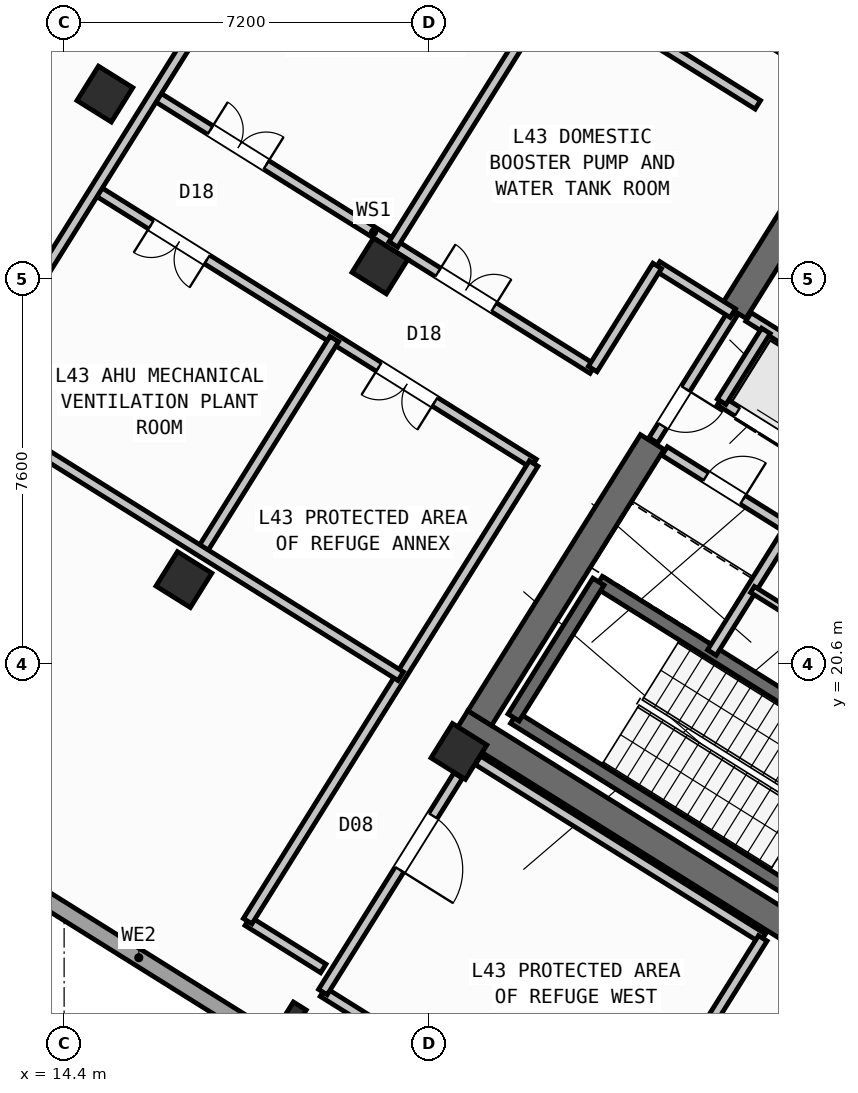
"""IFC4 building model, lengths in metres.
Left out: names, types, materials, properties, quantities, classifications, styles, units other than length and angle.
Written with IfcOpenShell. Run it as: python <this file> out.ifc"""

import sys

from ifc_helpers import new_model, si_unit, direction, frame, frame_2d, origin, origin_2d, place, context, subcontext, project, spatial, rectangle, hollow_rectangle, i_section, extrude, source, transform, mapped, element, fill, save


model = new_model("IFC4")
c1 = context("Model", 3, precision=1e-05, world=origin(), true_north=direction((0.0, 1.0)))
c2 = subcontext(c1, "Body", "Model", "MODEL_VIEW")
j1 = project(units=[si_unit("LENGTHUNIT", "METRE"), si_unit("PLANEANGLEUNIT", "RADIAN")], contexts=[c1])
p1 = place(None, origin())
s1 = spatial("IfcSite", under=j1, at=p1, CompositionType="ELEMENT")
p2 = place(p1, origin())
s2 = spatial("IfcBuilding", under=s1, at=p2, CompositionType="ELEMENT")
p3 = place(p2, frame((0.0, 0.0, 169.5)))
s3 = spatial("IfcBuildingStorey", under=s2, at=p3, CompositionType="ELEMENT", Elevation=169.5)
p4 = place(p3, frame((33.366, 12.477, 0.0), z_axis=(0.0, 0.0, 1.0), x_axis=(-0.848047359947, 0.529920442413, 0.0)))
e1 = element("IfcWall", 1, at=p4, inside=s3, PredefinedType="SHEAR", context=c2, shape_type="SweptSolid", body=[
    extrude(rectangle(XDim=13.14, YDim=0.55, at=frame_2d((6.57, 0.0))), origin(), (0.0, 0.0, 1.0), 5.15),
])
p5 = place(p3, frame((29.517, 30.594, 0.0), z_axis=(0.0, 0.0, 1.0), x_axis=(-0.529906864564, -0.848055844204, 0.0)))
e2 = element("IfcWall", 2, at=p5, inside=s3, PredefinedType="SHEAR", context=c2, shape_type="SweptSolid", body=[
    extrude(rectangle(XDim=3.575, YDim=0.55, at=frame_2d((1.788, 0.0))), origin(), (0.0, 0.0, 1.0), 5.15),
])
p6 = place(p3, frame((26.007, 24.976, 0.0), z_axis=(0.0, 0.0, 1.0), x_axis=(-0.529923795287, -0.848045264823, 0.0)))
e3 = element("IfcWall", 3, at=p6, inside=s3, PredefinedType="SHEAR", context=c2, shape_type="SweptSolid", body=[
    extrude(rectangle(XDim=6.425, YDim=0.55, at=frame_2d((3.212, 0.0))), origin(), (0.0, 0.0, 1.0), 5.15),
])
m1 = source(origin(), c2, "Body", "SweptSolid", [
    extrude(hollow_rectangle(XDim=0.8, YDim=0.8, WallThickness=0.032, at=origin_2d()), origin(), (0.0, 0.0, 1.0), 5.4),
])
p7 = place(p3, frame((22.191, 18.87, 0.0), z_axis=(0.0, 0.0, 1.0), x_axis=(-0.848048096156, 0.529919264233, 0.0)))
e4 = element("IfcColumn", 4, at=p7, inside=s3, PredefinedType="COLUMN", context=c2, shape_type="MappedRepresentation", body=[
    mapped(m1, transform((0.0, 0.0, 0.0), scale=1.0)),
])
m2 = source(origin(), c2, "Body", "SweptSolid", [
    extrude(i_section(OverallWidth=0.3, OverallDepth=0.55, WebThickness=0.015, FlangeThickness=0.029, at=origin_2d()), origin(), (0.0, 0.0, 1.0), 5.4),
])
p8 = place(p3, frame((18.906, 13.612, 0.0), z_axis=(0.0, 0.0, 1.0), x_axis=(-0.848048096156, 0.529919264233, 0.0)))
e5 = element("IfcColumn", 5, at=p8, inside=s3, PredefinedType="COLUMN", context=c2, shape_type="MappedRepresentation", body=[
    mapped(m2, transform((0.0, 0.0, 0.0), scale=1.0)),
])
for number, where, z_axis, x_axis in (
    (6, (20.632, 28.452, 0.0), (0.0, 0.0, 1.0), (-0.848, 0.53, 0.0)),
    (7, (16.764, 22.261, 0.0), (0.0, 0.0, 1.0), (-0.848, 0.53, 0.0)),
    (8, (15.205, 31.844, 0.0), (0.0, 0.0, 1.0), (-0.848, 0.53, 0.0)),
):
    element("IfcColumn", number, at=place(p3, frame(where, z_axis=z_axis, x_axis=x_axis)), inside=s3, PredefinedType="COLUMN", context=c2, shape_type="MappedRepresentation", body=[
        mapped(m1, transform((0.0, 0.0, 0.0), scale=1.0)),
    ])
p9 = place(p3, frame((29.268, 6.429, 0.0), z_axis=(0.0, 0.0, 1.0), x_axis=(-0.848049971435, 0.529916263149, 0.0)))
e9 = element("IfcWall", 9, at=p9, inside=s3, PredefinedType="STANDARD", context=c2, shape_type="SweptSolid", body=[
    extrude(rectangle(XDim=31.588, YDim=0.32, at=frame_2d((15.794, 0.0))), origin(), (0.0, 0.0, 1.0), 5.15),
])
p10 = place(p9, frame((6.007, 0.0, 0.95)))
e10 = element("IfcOpeningElement", 10, at=p10, cuts=e9, PredefinedType="OPENING", context=c2, shape_type="SweptSolid", body=[
    extrude(rectangle(XDim=1.25, YDim=1.4, at=frame_2d((0.625, 0.7))), frame((0.0, 0.17, 0.0), z_axis=(0.0, -1.0, 0.0), x_axis=(1.0, 0.0, 0.0)), (0.0, 0.0, 1.0), 0.34),
])
p11 = place(p3, frame((14.138, 41.825, 0.0), z_axis=(0.0, 0.0, 1.0), x_axis=(0.848046498049, -0.529921821731, 0.0)))
e11 = element("IfcWall", 11, at=p11, inside=s3, PredefinedType="STANDARD", context=c2, shape_type="SweptSolid", body=[
    extrude(rectangle(XDim=31.588, YDim=0.32, at=frame_2d((15.794, 0.0))), origin(), (0.0, 0.0, 1.0), 5.15),
])
p12 = place(p11, frame((2.369, 0.0, 0.95)))
e12 = element("IfcOpeningElement", 12, at=p12, cuts=e11, PredefinedType="OPENING", context=c2, shape_type="SweptSolid", body=[
    extrude(rectangle(XDim=1.25, YDim=1.4, at=frame_2d((0.625, 0.7))), frame((0.0, 0.17, 0.0), z_axis=(0.0, -1.0, 0.0), x_axis=(1.0, 0.0, 0.0)), (0.0, 0.0, 1.0), 0.34),
])
p13 = place(p11, frame((8.769, 0.0, 0.95)))
e13 = element("IfcOpeningElement", 13, at=p13, cuts=e11, PredefinedType="OPENING", context=c2, shape_type="SweptSolid", body=[
    extrude(rectangle(XDim=1.25, YDim=1.4, at=frame_2d((0.625, 0.7))), frame((0.0, 0.17, 0.0), z_axis=(0.0, -1.0, 0.0), x_axis=(1.0, 0.0, 0.0)), (0.0, 0.0, 1.0), 0.34),
])
p14 = place(p11, frame((15.169, 0.0, 0.95)))
e14 = element("IfcOpeningElement", 14, at=p14, cuts=e11, PredefinedType="OPENING", context=c2, shape_type="SweptSolid", body=[
    extrude(rectangle(XDim=1.25, YDim=1.4, at=frame_2d((0.625, 0.7))), frame((0.0, 0.17, 0.0), z_axis=(0.0, -1.0, 0.0), x_axis=(1.0, 0.0, 0.0)), (0.0, 0.0, 1.0), 0.34),
])
p15 = place(p11, frame((24.688, 0.0, 0.95)))
e15 = element("IfcOpeningElement", 15, at=p15, cuts=e11, PredefinedType="OPENING", context=c2, shape_type="SweptSolid", body=[
    extrude(rectangle(XDim=1.25, YDim=1.4, at=frame_2d((0.625, 0.7))), frame((0.0, 0.17, 0.0), z_axis=(0.0, -1.0, 0.0), x_axis=(1.0, 0.0, 0.0)), (0.0, 0.0, 1.0), 0.34),
])
p16 = place(p3, frame((29.605, 15.581, 0.0), z_axis=(0.0, 0.0, 1.0), x_axis=(-0.848036911448, 0.529937163087, 0.0)))
e16 = element("IfcWall", 16, at=p16, inside=s3, PredefinedType="SHEAR", context=c2, shape_type="SweptSolid", body=[
    extrude(rectangle(XDim=7.46, YDim=0.26, at=frame_2d((3.73, 0.0))), origin(), (0.0, 0.0, 1.0), 5.15),
])
p17 = place(p3, frame((31.28, 18.261, 0.0), z_axis=(0.0, 0.0, 1.0), x_axis=(-0.848051618787, 0.529913626805, 0.0)))
e17 = element("IfcWall", 17, at=p17, inside=s3, PredefinedType="SHEAR", context=c2, shape_type="SweptSolid", body=[
    extrude(rectangle(XDim=7.46, YDim=0.26, at=frame_2d((3.73, 0.0))), origin(), (0.0, 0.0, 1.0), 5.15),
])
p18 = place(p17, frame((0.36, 0.0, 0.0)))
e18 = element("IfcOpeningElement", 18, at=p18, cuts=e17, PredefinedType="OPENING", context=c2, shape_type="SweptSolid", body=[
    extrude(rectangle(XDim=0.86, YDim=2.05, at=frame_2d((0.43, 1.025))), frame((0.0, 0.14, 0.0), z_axis=(0.0, -1.0, 0.0), x_axis=(1.0, 0.0, 0.0)), (0.0, 0.0, 1.0), 0.28),
])
p19 = place(p3, frame((24.945, 22.22, 0.0), z_axis=(0.0, 0.0, 1.0), x_axis=(-0.529908658664, -0.84805472316, 0.0)))
e19 = element("IfcWall", 19, at=p19, inside=s3, PredefinedType="SHEAR", context=c2, shape_type="SweptSolid", body=[
    extrude(rectangle(XDim=3.16, YDim=0.26, at=frame_2d((1.58, 0.0))), origin(), (0.0, 0.0, 1.0), 5.15),
])
p20 = place(p3, frame((31.822, 24.998, 0.0), z_axis=(0.0, 0.0, 1.0), x_axis=(-0.848036912365, 0.52993716162, 0.0)))
e20 = element("IfcWall", 20, at=p20, inside=s3, PredefinedType="STANDARD", context=c2, shape_type="SweptSolid", body=[
    extrude(rectangle(XDim=4.618, YDim=0.2, at=frame_2d((2.309, 0.0))), origin(), (0.0, 0.0, 1.0), 5.14),
])
p21 = place(p3, frame((32.108, 22.814, 0.0), z_axis=(0.0, 0.0, 1.0), x_axis=(-0.848042229521, 0.529928652696, 0.0)))
e21 = element("IfcWall", 21, at=p21, inside=s3, PredefinedType="STANDARD", context=c2, shape_type="SweptSolid", body=[
    extrude(rectangle(XDim=5.62, YDim=0.2, at=frame_2d((2.81, 0.0))), origin(), (0.0, 0.0, 1.0), 5.14),
])
p22 = place(p21, frame((0.39, 0.0, 0.0)))
e22 = element("IfcOpeningElement", 22, at=p22, cuts=e21, PredefinedType="OPENING", context=c2, shape_type="SweptSolid", body=[
    extrude(rectangle(XDim=1.1, YDim=2.15, at=frame_2d((0.55, 1.075))), frame((0.0, 0.11, 0.0), z_axis=(0.0, -1.0, 0.0), x_axis=(1.0, 0.0, 0.0)), (0.0, 0.0, 1.0), 0.22),
])
p23 = place(p21, frame((2.25, 0.0, 0.0)))
e23 = element("IfcOpeningElement", 23, at=p23, cuts=e21, PredefinedType="OPENING", context=c2, shape_type="SweptSolid", body=[
    extrude(rectangle(XDim=1.1, YDim=2.15, at=frame_2d((0.55, 1.075))), frame((0.0, 0.11, 0.0), z_axis=(0.0, -1.0, 0.0), x_axis=(1.0, 0.0, 0.0)), (0.0, 0.0, 1.0), 0.22),
])
p24 = place(p21, frame((4.11, 0.0, 0.0)))
e24 = element("IfcOpeningElement", 24, at=p24, cuts=e21, PredefinedType="OPENING", context=c2, shape_type="SweptSolid", body=[
    extrude(rectangle(XDim=1.1, YDim=2.15, at=frame_2d((0.55, 1.075))), frame((0.0, 0.11, 0.0), z_axis=(0.0, -1.0, 0.0), x_axis=(1.0, 0.0, 0.0)), (0.0, 0.0, 1.0), 0.22),
])
p25 = place(p3, frame((28.25, 27.17, 0.0), z_axis=(0.0, 0.0, 1.0), x_axis=(-0.529905827651, -0.848056492117, 0.0)))
e25 = element("IfcWall", 25, at=p25, inside=s3, PredefinedType="STANDARD", context=c2, shape_type="SweptSolid", body=[
    extrude(rectangle(XDim=1.65, YDim=0.2, at=frame_2d((0.825, 0.0))), origin(), (0.0, 0.0, 1.0), 5.14),
])
p26 = place(p3, frame((28.71, 23.263, 0.0), z_axis=(0.0, 0.0, 1.0), x_axis=(-0.529907497854, -0.848055448493, 0.0)))
e26 = element("IfcWall", 26, at=p26, inside=s3, PredefinedType="STANDARD", context=c2, shape_type="SweptSolid", body=[
    extrude(rectangle(XDim=2.88, YDim=0.2, at=frame_2d((1.44, 0.0))), origin(), (0.0, 0.0, 1.0), 5.14),
])
p27 = place(p3, frame((31.525, 21.504, 0.0), z_axis=(0.0, 0.0, 1.0), x_axis=(-0.848040211232, 0.529931882541, 0.0)))
e27 = element("IfcWall", 27, at=p27, inside=s3, PredefinedType="STANDARD", context=c2, shape_type="SweptSolid", body=[
    extrude(rectangle(XDim=6.218, YDim=0.2, at=frame_2d((3.109, 0.0))), origin(), (0.0, 0.0, 1.0), 5.14),
])
p28 = place(p27, frame((4.4, 0.0, 0.0)))
e28 = element("IfcOpeningElement", 28, at=p28, cuts=e27, PredefinedType="OPENING", context=c2, shape_type="SweptSolid", body=[
    extrude(rectangle(XDim=0.86, YDim=2.05, at=frame_2d((0.43, 1.025))), frame((0.0, 0.11, 0.0), z_axis=(0.0, -1.0, 0.0), x_axis=(1.0, 0.0, 0.0)), (0.0, 0.0, 1.0), 0.22),
])
p29 = place(p27, frame((1.45, 0.0, 0.0)))
e29 = element("IfcOpeningElement", 29, at=p29, cuts=e27, PredefinedType="OPENING", context=c2, shape_type="SweptSolid", body=[
    extrude(rectangle(XDim=0.86, YDim=2.05, at=frame_2d((0.43, 1.025))), frame((0.0, 0.11, 0.0), z_axis=(0.0, -1.0, 0.0), x_axis=(1.0, 0.0, 0.0)), (0.0, 0.0, 1.0), 0.22),
])
p30 = place(p3, frame((30.766, 20.327, 0.0), z_axis=(0.0, 0.0, 1.0), x_axis=(-0.848052663127, 0.529911955482, 0.0)))
e30 = element("IfcWall", 30, at=p30, inside=s3, PredefinedType="PLUMBINGWALL", context=c2, shape_type="SweptSolid", body=[
    extrude(rectangle(XDim=3.28, YDim=0.14, at=frame_2d((1.64, 0.0))), origin(), (0.0, 0.0, 1.0), 5.14),
])
p31 = place(p30, frame((1.2, 0.0, 0.0)))
e31 = element("IfcOpeningElement", 31, at=p31, cuts=e30, PredefinedType="OPENING", context=c2, shape_type="SweptSolid", body=[
    extrude(rectangle(XDim=0.78, YDim=2.05, at=frame_2d((0.39, 1.025))), frame((0.0, 0.08, 0.0), z_axis=(0.0, -1.0, 0.0), x_axis=(1.0, 0.0, 0.0)), (0.0, 0.0, 1.0), 0.16),
])
p32 = place(p3, frame((24.832, 26.417, 0.0), z_axis=(0.0, 0.0, 1.0), x_axis=(-0.848045364107, 0.529923636401, 0.0)))
e32 = element("IfcWall", 32, at=p32, inside=s3, PredefinedType="STANDARD", context=c2, shape_type="SweptSolid", body=[
    extrude(rectangle(XDim=10.2, YDim=0.2, at=frame_2d((5.1, 0.0))), origin(), (0.0, 0.0, 1.0), 5.14),
])
p33 = place(p32, frame((2.3, 0.0, 0.0)))
e33 = element("IfcOpeningElement", 33, at=p33, cuts=e32, PredefinedType="OPENING", context=c2, shape_type="SweptSolid", body=[
    extrude(rectangle(XDim=1.3, YDim=2.15, at=frame_2d((0.65, 1.075))), frame((0.0, 0.11, 0.0), z_axis=(0.0, -1.0, 0.0), x_axis=(1.0, 0.0, 0.0)), (0.0, 0.0, 1.0), 0.22),
])
p34 = place(p32, frame((7.6, 0.0, 0.0)))
e34 = element("IfcOpeningElement", 34, at=p34, cuts=e32, PredefinedType="OPENING", context=c2, shape_type="SweptSolid", body=[
    extrude(rectangle(XDim=1.3, YDim=2.15, at=frame_2d((0.65, 1.075))), frame((0.0, 0.11, 0.0), z_axis=(0.0, -1.0, 0.0), x_axis=(1.0, 0.0, 0.0)), (0.0, 0.0, 1.0), 0.22),
])
p35 = place(p3, frame((23.666, 24.552, 0.0), z_axis=(0.0, 0.0, 1.0), x_axis=(-0.848038642463, 0.529934393004, 0.0)))
e35 = element("IfcWall", 35, at=p35, inside=s3, PredefinedType="STANDARD", context=c2, shape_type="SweptSolid", body=[
    extrude(rectangle(XDim=10.2, YDim=0.2, at=frame_2d((5.1, 0.0))), origin(), (0.0, 0.0, 1.0), 5.14),
])
p36 = place(p35, frame((2.3, 0.0, 0.0)))
e36 = element("IfcOpeningElement", 36, at=p36, cuts=e35, PredefinedType="OPENING", context=c2, shape_type="SweptSolid", body=[
    extrude(rectangle(XDim=1.3, YDim=2.15, at=frame_2d((0.65, 1.075))), frame((0.0, 0.11, 0.0), z_axis=(0.0, -1.0, 0.0), x_axis=(1.0, 0.0, 0.0)), (0.0, 0.0, 1.0), 0.22),
])
p37 = place(p35, frame((7.6, 0.0, 0.0)))
e37 = element("IfcOpeningElement", 37, at=p37, cuts=e35, PredefinedType="OPENING", context=c2, shape_type="SweptSolid", body=[
    extrude(rectangle(XDim=1.3, YDim=2.15, at=frame_2d((0.65, 1.075))), frame((0.0, 0.11, 0.0), z_axis=(0.0, -1.0, 0.0), x_axis=(1.0, 0.0, 0.0)), (0.0, 0.0, 1.0), 0.22),
])
p38 = place(p3, frame((19.441, 37.038, 0.0), z_axis=(0.0, 0.0, 1.0), x_axis=(-0.529936237412, -0.848037489901, 0.0)))
e38 = element("IfcWall", 38, at=p38, inside=s3, PredefinedType="STANDARD", context=c2, shape_type="SweptSolid", body=[
    extrude(rectangle(XDim=13.3, YDim=0.2, at=frame_2d((6.65, 0.0))), origin(), (0.0, 0.0, 1.0), 5.14),
])
p39 = place(p3, frame((27.596, 27.52, 0.0), z_axis=(0.0, 0.0, 1.0), x_axis=(-0.529865479138, -0.848081702443, 0.0)))
e39 = element("IfcWall", 39, at=p39, inside=s3, PredefinedType="STANDARD", context=c2, shape_type="SweptSolid", body=[
    extrude(rectangle(XDim=2.96, YDim=0.2, at=frame_2d((1.48, 0.0))), origin(), (0.0, 0.0, 1.0), 5.14),
])
p40 = place(p39, frame((1.76, 0.0, 0.0)))
e40 = element("IfcOpeningElement", 40, at=p40, cuts=e39, PredefinedType="OPENING", context=c2, shape_type="SweptSolid", body=[
    extrude(rectangle(XDim=0.86, YDim=2.05, at=frame_2d((0.43, 1.025))), frame((0.0, 0.11, 0.0), z_axis=(0.0, -1.0, 0.0), x_axis=(1.0, 0.0, 0.0)), (0.0, 0.0, 1.0), 0.22),
])
p41 = place(p3, frame((28.188, 15.182, 0.0), z_axis=(0.0, 0.0, 1.0), x_axis=(-0.848064515696, 0.529892986571, 0.0)))
e41 = element("IfcWall", 41, at=p41, inside=s3, PredefinedType="STANDARD", context=c2, shape_type="SweptSolid", body=[
    extrude(rectangle(XDim=6.628, YDim=0.2, at=frame_2d((3.314, 0.0))), origin(), (0.0, 0.0, 1.0), 5.14),
])
p42 = place(p3, frame((25.273, 10.517, 0.0), z_axis=(0.0, 0.0, 1.0), x_axis=(-0.848048724775, 0.529918258231, 0.0)))
e42 = element("IfcWall", 42, at=p42, inside=s3, PredefinedType="STANDARD", context=c2, shape_type="SweptSolid", body=[
    extrude(rectangle(XDim=6.8, YDim=0.2, at=frame_2d((3.4, 0.0))), origin(), (0.0, 0.0, 1.0), 5.14),
])
p43 = place(p3, frame((28.188, 15.182, 0.0), z_axis=(0.0, 0.0, 1.0), x_axis=(-0.52991514706, -0.848050668838, 0.0)))
e43 = element("IfcWall", 43, at=p43, inside=s3, PredefinedType="STANDARD", context=c2, shape_type="SweptSolid", body=[
    extrude(rectangle(XDim=5.5, YDim=0.2, at=frame_2d((2.75, 0.0))), origin(), (0.0, 0.0, 1.0), 5.14),
])
p44 = place(p3, frame((22.176, 18.393, 0.0), z_axis=(0.0, 0.0, 1.0), x_axis=(-0.529911817823, -0.848052749145, 0.0)))
e44 = element("IfcWall", 44, at=p44, inside=s3, PredefinedType="STANDARD", context=c2, shape_type="SweptSolid", body=[
    extrude(rectangle(XDim=5.038, YDim=0.2, at=frame_2d((2.519, 0.0))), origin(), (0.0, 0.0, 1.0), 4.625),
])
p45 = place(p44, frame((0.938, 0.0, 0.0)))
e45 = element("IfcOpeningElement", 45, at=p45, cuts=e44, PredefinedType="OPENING", context=c2, shape_type="SweptSolid", body=[
    extrude(rectangle(XDim=1.25, YDim=2.15, at=frame_2d((0.625, 1.075))), frame((0.0, 0.11, 0.0), z_axis=(0.0, -1.0, 0.0), x_axis=(1.0, 0.0, 0.0)), (0.0, 0.0, 1.0), 0.22),
])
p46 = place(p3, frame((27.596, 27.52, 0.0), z_axis=(0.0, 0.0, 1.0), x_axis=(-0.848037269931, 0.529936589422, 0.0)))
e46 = element("IfcWall", 46, at=p46, inside=s3, PredefinedType="STANDARD", context=c2, shape_type="SweptSolid", body=[
    extrude(rectangle(XDim=1.76, YDim=0.2, at=frame_2d((0.88, 0.0))), origin(), (0.0, 0.0, 1.0), 5.14),
])
p47 = place(p3, frame((19.515, 14.587, 0.0), z_axis=(0.0, 0.0, 1.0), x_axis=(-0.848076222107, 0.529874250646, 0.0)))
e47 = element("IfcWall", 47, at=p47, inside=s3, PredefinedType="STANDARD", context=c2, shape_type="SweptSolid", body=[
    extrude(rectangle(XDim=1.76, YDim=0.2, at=frame_2d((0.88, 0.0))), origin(), (0.0, 0.0, 1.0), 5.14),
])
p48 = place(p3, frame((26.104, 28.453, 0.0), z_axis=(0.0, 0.0, 1.0), x_axis=(-0.529880066358, -0.848072588448, 0.0)))
e48 = element("IfcWall", 48, at=p48, inside=s3, PredefinedType="STANDARD", context=c2, shape_type="SweptSolid", body=[
    extrude(rectangle(XDim=2.4, YDim=0.2, at=frame_2d((1.2, 0.0))), origin(), (0.0, 0.0, 1.0), 5.14),
])
p49 = place(p3, frame((23.666, 24.552, 0.0), z_axis=(0.0, 0.0, 1.0), x_axis=(-0.529912392506, -0.848052390049, 0.0)))
e49 = element("IfcWall", 49, at=p49, inside=s3, PredefinedType="STANDARD", context=c2, shape_type="SweptSolid", body=[
    extrude(rectangle(XDim=10.65, YDim=0.2, at=frame_2d((5.325, 0.0))), origin(), (0.0, 0.0, 1.0), 5.14),
])
p50 = place(p3, frame((19.731, 27.01, 0.0), z_axis=(0.0, 0.0, 1.0), x_axis=(-0.529896970672, -0.848062026312, 0.0)))
e50 = element("IfcWall", 50, at=p50, inside=s3, PredefinedType="STANDARD", context=c2, shape_type="SweptSolid", body=[
    extrude(rectangle(XDim=4.95, YDim=0.2, at=frame_2d((2.475, 0.0))), origin(), (0.0, 0.0, 1.0), 4.625),
])
p51 = place(p3, frame((24.156, 34.092, 0.0), z_axis=(0.0, 0.0, 1.0), x_axis=(-0.529934707271, -0.84803844608, 0.0)))
e51 = element("IfcWall", 51, at=p51, inside=s3, PredefinedType="STANDARD", context=c2, shape_type="SweptSolid", body=[
    extrude(rectangle(XDim=6.15, YDim=0.2, at=frame_2d((3.075, 0.0))), origin(), (0.0, 0.0, 1.0), 4.625),
])
p52 = place(p3, frame((21.043, 20.354, 0.0), z_axis=(0.0, 0.0, 1.0), x_axis=(-0.848045364107, 0.529923636401, 0.0)))
e52 = element("IfcWall", 52, at=p52, inside=s3, PredefinedType="STANDARD", context=c2, shape_type="SweptSolid", body=[
    extrude(rectangle(XDim=10.2, YDim=0.2, at=frame_2d((5.1, 0.0))), origin(), (0.0, 0.0, 1.0), 5.14),
])
p53 = place(p3, frame((28.091, 31.633, 0.0), z_axis=(0.0, 0.0, 1.0), x_axis=(-0.848049399204, 0.529917178916, 0.0)))
e53 = element("IfcWall", 53, at=p53, inside=s3, PredefinedType="STANDARD", context=c2, shape_type="SweptSolid", body=[
    extrude(rectangle(XDim=10.2, YDim=0.2, at=frame_2d((5.1, 0.0))), origin(), (0.0, 0.0, 1.0), 5.14),
])
m3 = source(origin(), c2, "Body", "SweptSolid", [
    extrude(rectangle(XDim=1.1, YDim=2.15, at=frame_2d((0.55, 1.075))), frame((0.0, 0.025, 0.0), z_axis=(0.0, -1.0, 0.0), x_axis=(1.0, 0.0, 0.0)), (0.0, 0.0, 1.0), 0.05),
])
p54 = place(p24, origin())
e54 = element("IfcDoor", 54, at=p54, inside=s3, OperationType="DOUBLE_DOOR_SLIDING", PredefinedType="DOOR", context=c2, shape_type="MappedRepresentation", body=[
    mapped(m3, transform((0.0, 0.0, 0.0), scale=1.0)),
])
fill(e24, e54)
m4 = source(origin(), c2, "Body", "SweptSolid", [
    extrude(rectangle(XDim=0.86, YDim=2.05, at=frame_2d((0.43, 1.025))), frame((0.0, 0.025, 0.0), z_axis=(0.0, -1.0, 0.0), x_axis=(1.0, 0.0, 0.0)), (0.0, 0.0, 1.0), 0.05),
])
p55 = place(p28, frame((0.86, 0.0, 0.0), z_axis=(0.0, 0.0, 1.0), x_axis=(-1.0, 0.0, 0.0)))
e55 = element("IfcDoor", 55, at=p55, inside=s3, OperationType="SINGLE_SWING_RIGHT", PredefinedType="DOOR", context=c2, shape_type="MappedRepresentation", body=[
    mapped(m4, transform((0.0, 0.0, 0.0), scale=1.0)),
])
fill(e28, e55)
p56 = place(p40, origin())
e56 = element("IfcDoor", 56, at=p56, inside=s3, OperationType="SINGLE_SWING_LEFT", PredefinedType="DOOR", context=c2, shape_type="MappedRepresentation", body=[
    mapped(m4, transform((0.0, 0.0, 0.0), scale=1.0)),
])
fill(e40, e56)
m5 = source(origin(), c2, "Body", "SweptSolid", [
    extrude(rectangle(XDim=1.25, YDim=2.15, at=frame_2d((0.625, 1.075))), frame((0.0, 0.025, 0.0), z_axis=(0.0, -1.0, 0.0), x_axis=(1.0, 0.0, 0.0)), (0.0, 0.0, 1.0), 0.05),
])
p57 = place(p45, origin())
e57 = element("IfcDoor", 57, at=p57, inside=s3, OperationType="SINGLE_SWING_RIGHT", PredefinedType="DOOR", context=c2, shape_type="MappedRepresentation", body=[
    mapped(m5, transform((0.0, 0.0, 0.0), scale=1.0)),
])
fill(e45, e57)
m6 = source(origin(), c2, "Body", "SweptSolid", [
    extrude(rectangle(XDim=1.3, YDim=2.15, at=frame_2d((0.65, 1.075))), frame((0.0, 0.025, 0.0), z_axis=(0.0, -1.0, 0.0), x_axis=(1.0, 0.0, 0.0)), (0.0, 0.0, 1.0), 0.05),
])
p58 = place(p36, origin())
e58 = element("IfcDoor", 58, at=p58, inside=s3, OperationType="DOUBLE_DOOR_SINGLE_SWING", PredefinedType="DOOR", context=c2, shape_type="MappedRepresentation", body=[
    mapped(m6, transform((0.0, 0.0, 0.0), scale=1.0)),
])
fill(e36, e58)
p59 = place(p37, origin())
e59 = element("IfcDoor", 59, at=p59, inside=s3, OperationType="DOUBLE_DOOR_SINGLE_SWING", PredefinedType="DOOR", context=c2, shape_type="MappedRepresentation", body=[
    mapped(m6, transform((0.0, 0.0, 0.0), scale=1.0)),
])
fill(e37, e59)
p60 = place(p33, frame((1.3, 0.0, 0.0), z_axis=(0.0, 0.0, 1.0), x_axis=(-1.0, 0.0, 0.0)))
e60 = element("IfcDoor", 60, at=p60, inside=s3, OperationType="DOUBLE_DOOR_SINGLE_SWING", PredefinedType="DOOR", context=c2, shape_type="MappedRepresentation", body=[
    mapped(m6, transform((0.0, 0.0, 0.0), scale=1.0)),
])
fill(e33, e60)
p61 = place(p34, frame((1.3, 0.0, 0.0), z_axis=(0.0, 0.0, 1.0), x_axis=(-1.0, 0.0, 0.0)))
e61 = element("IfcDoor", 61, at=p61, inside=s3, OperationType="DOUBLE_DOOR_SINGLE_SWING", PredefinedType="DOOR", context=c2, shape_type="MappedRepresentation", body=[
    mapped(m6, transform((0.0, 0.0, 0.0), scale=1.0)),
])
fill(e34, e61)
save(model, sys.argv[1])
